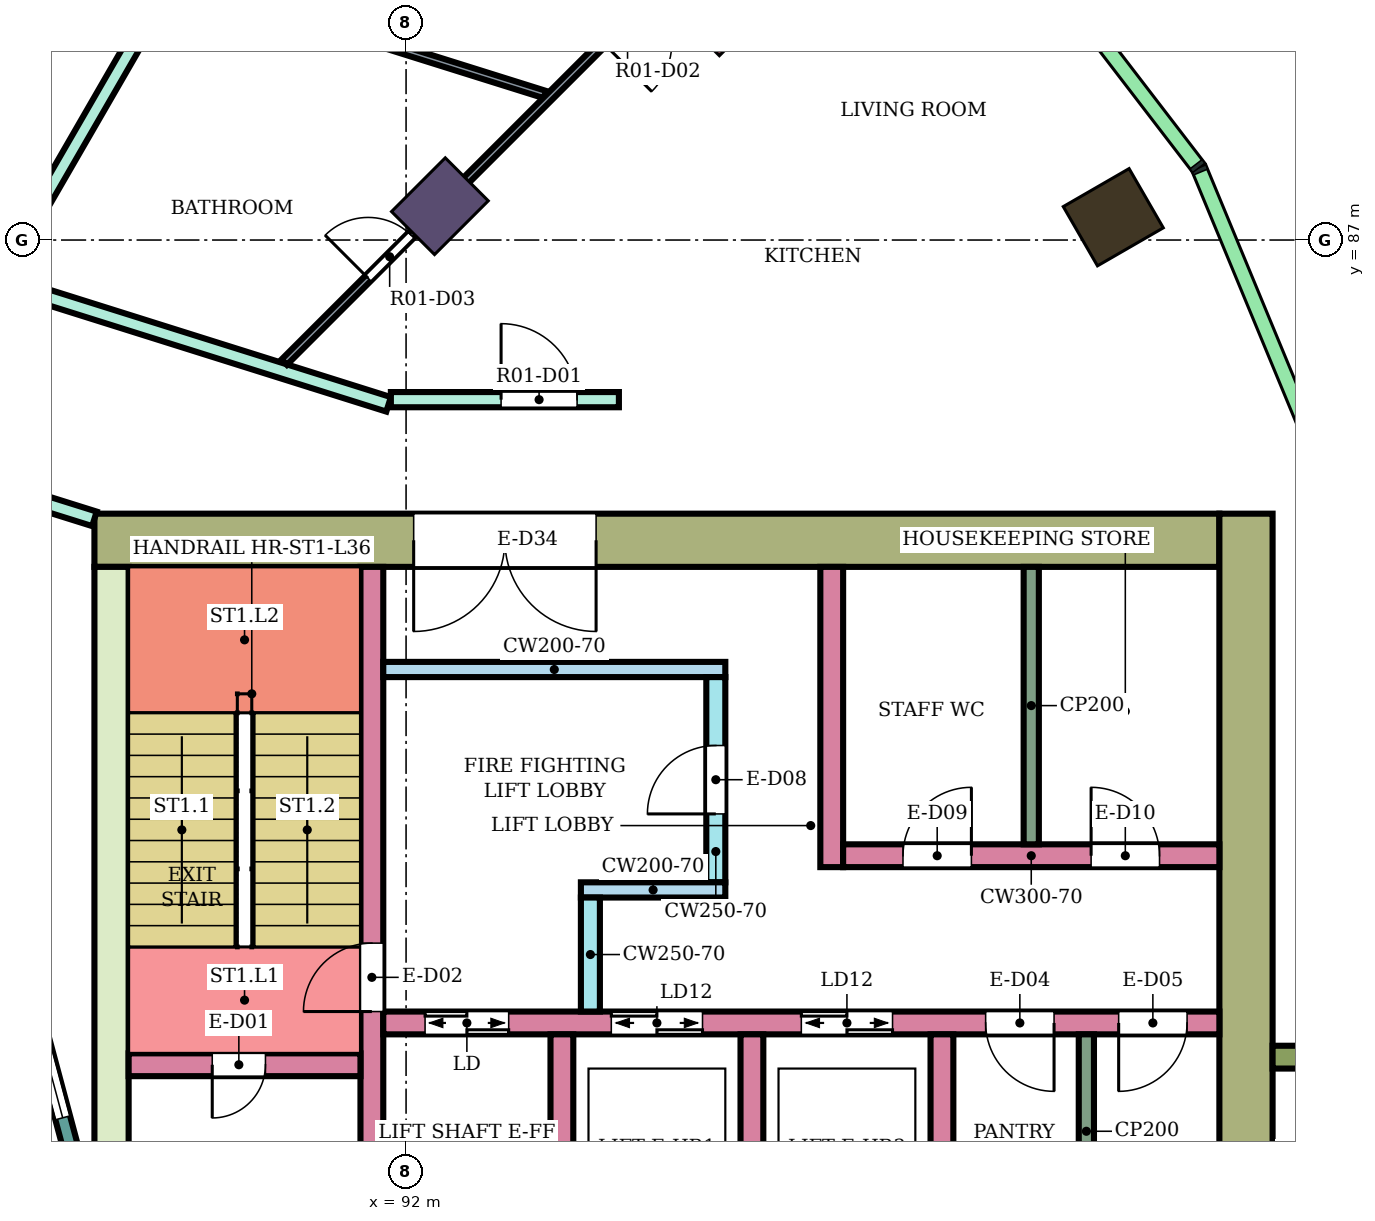
"""IFC4 building model, lengths in metres.
Left out: names, types, materials, properties, quantities, classifications, styles, units other than length and angle.
Written with IfcOpenShell. Run it as: python <this file> out.ifc"""

import sys

from ifc_helpers import new_model, si_unit, direction, frame, frame_2d, origin, origin_2d, place, context, subcontext, project, spatial, rectangle, extrude, element, fill, save


model = new_model("IFC4")
c1 = context("Model", 3, precision=1e-05, world=origin(), true_north=direction((0.0, 1.0)))
c2 = subcontext(c1, "Body", "Model", "MODEL_VIEW")
j1 = project(units=[si_unit("LENGTHUNIT", "METRE"), si_unit("PLANEANGLEUNIT", "RADIAN")], contexts=[c1])
p1 = place(None, origin())
s1 = spatial("IfcSite", under=j1, at=p1, CompositionType="ELEMENT")
p2 = place(p1, origin())
s2 = spatial("IfcBuilding", under=s1, at=p2, CompositionType="ELEMENT")
p3 = place(p2, frame((0.0, 0.0, 157.7)))
s3 = spatial("IfcBuildingStorey", under=s2, at=p3, CompositionType="ELEMENT", Elevation=157.7)
p4 = place(p3, frame((101.304, 87.3, 0.0), z_axis=(0.0, 0.0, 1.0), x_axis=(0.866025403784, 0.5, 0.0)))
e1 = element("IfcColumn", 1, at=p4, inside=s3, PredefinedType="COLUMN", context=c2, shape_type="SweptSolid", body=[
    extrude(rectangle(XDim=1.0, YDim=0.9, at=origin_2d()), origin(), (0.0, 0.0, 1.0), 4.1),
])
p5 = place(p3, frame((92.445, 87.445, 0.0), z_axis=(0.0, 0.0, 1.0), x_axis=(0.707106781187, 0.707106781187, 0.0)))
e2 = element("IfcColumn", 2, at=p5, inside=s3, PredefinedType="COLUMN", context=c2, shape_type="SweptSolid", body=[
    extrude(rectangle(XDim=1.0, YDim=0.8, at=origin_2d()), origin(), (0.0, 0.0, 1.0), 4.1),
])
p6 = place(p3, frame((95.91, 90.91, 0.0), z_axis=(0.0, 0.0, 1.0), x_axis=(0.707106781187, 0.707106781187, 0.0)))
e3 = element("IfcColumn", 3, at=p6, inside=s3, PredefinedType="COLUMN", context=c2, shape_type="SweptSolid", body=[
    extrude(rectangle(XDim=1.8, YDim=2.4, at=origin_2d()), origin(), (0.0, 0.0, 1.0), 4.1),
])
p7 = place(p3, frame((87.9, 83.05, 0.0), z_axis=(0.0, 0.0, 1.0), x_axis=(1.0, 0.0, 0.0)))
e4 = element("IfcWall", 4, at=p7, inside=s3, PredefinedType="SHEAR", context=c2, shape_type="SweptSolid", body=[
    extrude(rectangle(XDim=14.8, YDim=0.7, at=frame_2d((7.4, 0.0))), origin(), (0.0, 0.0, 1.0), 3.78),
])
p8 = place(p7, frame((4.2, 0.0, 0.0)))
e5 = element("IfcOpeningElement", 5, at=p8, cuts=e4, PredefinedType="OPENING", context=c2, shape_type="SweptSolid", body=[
    extrude(rectangle(XDim=2.4, YDim=2.4, at=frame_2d((1.2, 1.2))), frame((0.0, 0.36, 0.0), z_axis=(0.0, -1.0, 0.0), x_axis=(1.0, 0.0, 0.0)), (0.0, 0.0, 1.0), 0.72),
])
p9 = place(p3, frame((88.125, 75.0, 0.0), z_axis=(0.0, 0.0, 1.0), x_axis=(0.0, 1.0, 0.0)))
e6 = element("IfcWall", 6, at=p9, inside=s3, PredefinedType="SHEAR", context=c2, shape_type="SweptSolid", body=[
    extrude(rectangle(XDim=7.7, YDim=0.45, at=frame_2d((3.85, 0.0))), origin(), (0.0, 0.0, 1.0), 3.78),
])
p10 = place(p3, frame((103.05, 66.6, 0.0), z_axis=(0.0, 0.0, 1.0), x_axis=(0.0, 1.0, 0.0)))
e7 = element("IfcWall", 7, at=p10, inside=s3, PredefinedType="SHEAR", context=c2, shape_type="SweptSolid", body=[
    extrude(rectangle(XDim=16.8, YDim=0.7, at=frame_2d((8.4, 0.0))), origin(), (0.0, 0.0, 1.0), 3.78),
])
p11 = place(p3, frame((91.55, 75.0, 0.0), z_axis=(0.0, 0.0, 1.0), x_axis=(0.0, 1.0, 0.0)))
e8 = element("IfcWall", 8, at=p11, inside=s3, PredefinedType="SHEAR", context=c2, shape_type="SweptSolid", body=[
    extrude(rectangle(XDim=7.7, YDim=0.3, at=frame_2d((3.85, 0.0))), origin(), (0.0, 0.0, 1.0), 3.78),
])
p12 = place(p11, frame((1.85, 0.0, 0.0)))
e9 = element("IfcOpeningElement", 9, at=p12, cuts=e8, PredefinedType="OPENING", context=c2, shape_type="SweptSolid", body=[
    extrude(rectangle(XDim=0.9, YDim=2.1, at=frame_2d((0.45, 1.05))), frame((0.0, 0.16, 0.0), z_axis=(0.0, -1.0, 0.0), x_axis=(1.0, 0.0, 0.0)), (0.0, 0.0, 1.0), 0.32),
])
p13 = place(p3, frame((88.35, 76.15, 0.0), z_axis=(0.0, 0.0, 1.0), x_axis=(1.0, 0.0, 0.0)))
e10 = element("IfcWall", 10, at=p13, inside=s3, PredefinedType="SHEAR", context=c2, shape_type="SweptSolid", body=[
    extrude(rectangle(XDim=3.05, YDim=0.3, at=frame_2d((1.525, 0.0))), origin(), (0.0, 0.0, 1.0), 3.78),
])
p14 = place(p13, frame((1.1, 0.0, 0.0)))
e11 = element("IfcOpeningElement", 11, at=p14, cuts=e10, PredefinedType="OPENING", context=c2, shape_type="SweptSolid", body=[
    extrude(rectangle(XDim=0.7, YDim=2.0, at=frame_2d((0.35, 1.0))), frame((0.0, 0.16, 0.0), z_axis=(0.0, -1.0, 0.0), x_axis=(1.0, 0.0, 0.0)), (0.0, 0.0, 1.0), 0.32),
])
p15 = place(p3, frame((91.7, 76.7, 0.0), z_axis=(0.0, 0.0, 1.0), x_axis=(1.0, 0.0, 0.0)))
e12 = element("IfcWall", 12, at=p15, inside=s3, PredefinedType="SHEAR", context=c2, shape_type="SweptSolid", body=[
    extrude(rectangle(XDim=11.0, YDim=0.3, at=frame_2d((5.5, 0.0))), origin(), (0.0, 0.0, 1.0), 3.78),
])
p16 = place(p15, frame((0.55, 0.0, 0.0)))
e13 = element("IfcOpeningElement", 13, at=p16, cuts=e12, PredefinedType="OPENING", context=c2, shape_type="SweptSolid", body=[
    extrude(rectangle(XDim=1.1, YDim=2.1, at=frame_2d((0.55, 1.05))), frame((0.0, 0.16, 0.0), z_axis=(0.0, -1.0, 0.0), x_axis=(1.0, 0.0, 0.0)), (0.0, 0.0, 1.0), 0.32),
])
p17 = place(p15, frame((3.0, 0.0, 0.0)))
e14 = element("IfcOpeningElement", 14, at=p17, cuts=e12, PredefinedType="OPENING", context=c2, shape_type="SweptSolid", body=[
    extrude(rectangle(XDim=1.2, YDim=2.1, at=frame_2d((0.6, 1.05))), frame((0.0, 0.16, 0.0), z_axis=(0.0, -1.0, 0.0), x_axis=(1.0, 0.0, 0.0)), (0.0, 0.0, 1.0), 0.32),
])
p18 = place(p15, frame((5.5, 0.0, 0.0)))
e15 = element("IfcOpeningElement", 15, at=p18, cuts=e12, PredefinedType="OPENING", context=c2, shape_type="SweptSolid", body=[
    extrude(rectangle(XDim=1.2, YDim=2.1, at=frame_2d((0.6, 1.05))), frame((0.0, 0.16, 0.0), z_axis=(0.0, -1.0, 0.0), x_axis=(1.0, 0.0, 0.0)), (0.0, 0.0, 1.0), 0.32),
])
p19 = place(p15, frame((7.925, 0.0, 0.0)))
e16 = element("IfcOpeningElement", 16, at=p19, cuts=e12, PredefinedType="OPENING", context=c2, shape_type="SweptSolid", body=[
    extrude(rectangle(XDim=0.9, YDim=2.1, at=frame_2d((0.45, 1.05))), frame((0.0, 0.16, 0.0), z_axis=(0.0, -1.0, 0.0), x_axis=(1.0, 0.0, 0.0)), (0.0, 0.0, 1.0), 0.32),
])
p20 = place(p15, frame((9.675, 0.0, 0.0)))
e17 = element("IfcOpeningElement", 17, at=p20, cuts=e12, PredefinedType="OPENING", context=c2, shape_type="SweptSolid", body=[
    extrude(rectangle(XDim=0.9, YDim=2.1, at=frame_2d((0.45, 1.05))), frame((0.0, 0.16, 0.0), z_axis=(0.0, -1.0, 0.0), x_axis=(1.0, 0.0, 0.0)), (0.0, 0.0, 1.0), 0.32),
])
for number, where, z_axis, x_axis in (
    (18, (94.05, 74.0, 0.0), (0.0, 0.0, 1.0), (0.0, 1.0, 0.0)),
    (19, (96.55, 74.0, 0.0), (0.0, 0.0, 1.0), (0.0, 1.0, 0.0)),
    (20, (99.05, 74.0, 0.0), (0.0, 0.0, 1.0), (0.0, 1.0, 0.0)),
):
    element("IfcWall", number, at=place(p3, frame(where, z_axis=z_axis, x_axis=x_axis)), inside=s3, PredefinedType="SHEAR", context=c2, shape_type="SweptSolid", body=[
        extrude(rectangle(XDim=2.55, YDim=0.3, at=frame_2d((1.275, 0.0))), origin(), (0.0, 0.0, 1.0), 3.78),
    ])
p21 = place(p3, frame((91.7, 81.35, 0.0), z_axis=(0.0, 0.0, 1.0), x_axis=(1.0, 0.0, 0.0)))
e21 = element("IfcWall", 21, at=p21, inside=s3, PredefinedType="SHEAR", context=c2, shape_type="SweptSolid", body=[
    extrude(rectangle(XDim=4.5, YDim=0.2, at=frame_2d((2.25, 0.0))), origin(), (0.0, 0.0, 1.0), 3.78),
])
p22 = place(p3, frame((96.075, 78.55, 0.0), z_axis=(0.0, 0.0, 1.0), x_axis=(0.0, 1.0, 0.0)))
e22 = element("IfcWall", 22, at=p22, inside=s3, PredefinedType="SHEAR", context=c2, shape_type="SweptSolid", body=[
    extrude(rectangle(XDim=2.7, YDim=0.25, at=frame_2d((1.35, 0.0))), origin(), (0.0, 0.0, 1.0), 3.78),
])
p23 = place(p22, frame((0.9, 0.0, 0.0)))
e23 = element("IfcOpeningElement", 23, at=p23, cuts=e22, PredefinedType="OPENING", context=c2, shape_type="SweptSolid", body=[
    extrude(rectangle(XDim=0.9, YDim=2.1, at=frame_2d((0.45, 1.05))), frame((0.0, 0.135, 0.0), z_axis=(0.0, -1.0, 0.0), x_axis=(1.0, 0.0, 0.0)), (0.0, 0.0, 1.0), 0.27),
])
p24 = place(p3, frame((94.3, 78.45, 0.0), z_axis=(0.0, 0.0, 1.0), x_axis=(1.0, 0.0, 0.0)))
e24 = element("IfcWall", 24, at=p24, inside=s3, PredefinedType="SHEAR", context=c2, shape_type="SweptSolid", body=[
    extrude(rectangle(XDim=1.9, YDim=0.2, at=frame_2d((0.95, 0.0))), origin(), (0.0, 0.0, 1.0), 3.78),
])
p25 = place(p3, frame((94.425, 76.85, 0.0), z_axis=(0.0, 0.0, 1.0), x_axis=(0.0, 1.0, 0.0)))
e25 = element("IfcWall", 25, at=p25, inside=s3, PredefinedType="SHEAR", context=c2, shape_type="SweptSolid", body=[
    extrude(rectangle(XDim=1.5, YDim=0.25, at=frame_2d((0.75, 0.0))), origin(), (0.0, 0.0, 1.0), 3.78),
])
p26 = place(p3, frame((97.6, 78.75, 0.0), z_axis=(0.0, 0.0, 1.0), x_axis=(0.0, 1.0, 0.0)))
e26 = element("IfcWall", 26, at=p26, inside=s3, PredefinedType="SHEAR", context=c2, shape_type="SweptSolid", body=[
    extrude(rectangle(XDim=3.95, YDim=0.3, at=frame_2d((1.975, 0.0))), origin(), (0.0, 0.0, 1.0), 3.78),
])
p27 = place(p3, frame((97.75, 78.9, 0.0), z_axis=(0.0, 0.0, 1.0), x_axis=(1.0, 0.0, 0.0)))
e27 = element("IfcWall", 27, at=p27, inside=s3, PredefinedType="SHEAR", context=c2, shape_type="SweptSolid", body=[
    extrude(rectangle(XDim=4.95, YDim=0.3, at=frame_2d((2.475, 0.0))), origin(), (0.0, 0.0, 1.0), 3.78),
])
p28 = place(p27, frame((0.788, 0.0, 0.0)))
e28 = element("IfcOpeningElement", 28, at=p28, cuts=e27, PredefinedType="OPENING", context=c2, shape_type="SweptSolid", body=[
    extrude(rectangle(XDim=0.9, YDim=2.1, at=frame_2d((0.45, 1.05))), frame((0.0, 0.16, 0.0), z_axis=(0.0, -1.0, 0.0), x_axis=(1.0, 0.0, 0.0)), (0.0, 0.0, 1.0), 0.32),
])
p29 = place(p27, frame((3.262, 0.0, 0.0)))
e29 = element("IfcOpeningElement", 29, at=p29, cuts=e27, PredefinedType="OPENING", context=c2, shape_type="SweptSolid", body=[
    extrude(rectangle(XDim=0.9, YDim=2.1, at=frame_2d((0.45, 1.05))), frame((0.0, 0.16, 0.0), z_axis=(0.0, -1.0, 0.0), x_axis=(1.0, 0.0, 0.0)), (0.0, 0.0, 1.0), 0.32),
])
p30 = place(p3, frame((103.4, 76.25, 0.0), z_axis=(0.0, 0.0, 1.0), x_axis=(1.0, 0.0, 0.0)))
e30 = element("IfcWall", 30, at=p30, inside=s3, PredefinedType="NOTDEFINED", context=c2, shape_type="SweptSolid", body=[
    extrude(rectangle(XDim=2.416, YDim=0.3, at=frame_2d((1.208, 0.0))), origin(), (0.0, 0.0, 1.0), 4.1),
])
p31 = place(p3, frame((87.604, 75.0, 0.0), z_axis=(0.0, 0.0, 1.0), x_axis=(-0.258789828301, 0.965933654434, 0.0)))
e31 = element("IfcWall", 31, at=p31, inside=s3, PredefinedType="NOTDEFINED", context=c2, shape_type="SweptSolid", body=[
    extrude(rectangle(XDim=3.936, YDim=0.2, at=frame_2d((1.968, 0.0))), origin(), (0.0, 0.0, 1.0), 4.1),
])
p32 = place(p31, frame((0.468, 0.0, 0.9)))
e32 = element("IfcOpeningElement", 32, at=p32, cuts=e31, PredefinedType="OPENING", context=c2, shape_type="SweptSolid", body=[
    extrude(rectangle(XDim=3.0, YDim=2.3, at=frame_2d((1.5, 1.15))), frame((0.0, 0.11, 0.0), z_axis=(0.0, -1.0, 0.0), x_axis=(1.0, 0.0, 0.0)), (0.0, 0.0, 1.0), 0.22),
])
p33 = place(p3, frame((85.587, 84.057, 0.0), z_axis=(0.0, 0.0, 1.0), x_axis=(0.954239513179, -0.299043393987, 0.0)))
e33 = element("IfcWall", 33, at=p33, inside=s3, PredefinedType="PARTITIONING", context=c2, shape_type="SweptSolid", body=[
    extrude(rectangle(XDim=2.424, YDim=0.2, at=frame_2d((1.212, 0.0))), origin(), (0.0, 0.0, 1.0), 3.65),
])
p34 = place(p33, frame((0.762, 0.0, 0.0)))
e34 = element("IfcOpeningElement", 34, at=p34, cuts=e33, PredefinedType="OPENING", context=c2, shape_type="SweptSolid", body=[
    extrude(rectangle(XDim=0.9, YDim=2.1, at=frame_2d((0.45, 1.05))), frame((0.0, 0.11, 0.0), z_axis=(0.0, -1.0, 0.0), x_axis=(1.0, 0.0, 0.0)), (0.0, 0.0, 1.0), 0.22),
])
p35 = place(p3, frame((86.313, 86.555, 0.0), z_axis=(0.0, 0.0, 1.0), x_axis=(0.953919398959, -0.300062960544, 0.0)))
e35 = element("IfcWall", 35, at=p35, inside=s3, PredefinedType="PARTITIONING", context=c2, shape_type="SweptSolid", body=[
    extrude(rectangle(XDim=5.721, YDim=0.2, at=frame_2d((2.86, 0.0))), origin(), (0.0, 0.0, 1.0), 3.65),
])
p36 = place(p3, frame((86.677, 86.564, 0.0), z_axis=(0.0, 0.0, 1.0), x_axis=(0.500120377296, 0.865955892764, 0.0)))
e36 = element("IfcWall", 36, at=p36, inside=s3, PredefinedType="PARTITIONING", context=c2, shape_type="SweptSolid", body=[
    extrude(rectangle(XDim=12.445, YDim=0.2, at=frame_2d((6.222, 0.0))), origin(), (0.0, 0.0, 1.0), 3.65),
])
p37 = place(p3, frame((91.8, 84.9, 0.0), z_axis=(0.0, 0.0, 1.0), x_axis=(1.0, 0.0, 0.0)))
e37 = element("IfcWall", 37, at=p37, inside=s3, PredefinedType="PARTITIONING", context=c2, shape_type="SweptSolid", body=[
    extrude(rectangle(XDim=3.0, YDim=0.2, at=frame_2d((1.5, 0.0))), origin(), (0.0, 0.0, 1.0), 3.65),
])
p38 = place(p37, frame((1.45, 0.0, 0.0)))
e38 = element("IfcOpeningElement", 38, at=p38, cuts=e37, PredefinedType="OPENING", context=c2, shape_type="SweptSolid", body=[
    extrude(rectangle(XDim=1.0, YDim=2.1, at=frame_2d((0.5, 1.05))), frame((0.0, 0.11, 0.0), z_axis=(0.0, -1.0, 0.0), x_axis=(1.0, 0.0, 0.0)), (0.0, 0.0, 1.0), 0.22),
])
p39 = place(p3, frame((89.026, 90.419, 0.0), z_axis=(0.0, 0.0, 1.0), x_axis=(0.954207609901, -0.299145177475, 0.0)))
e39 = element("IfcWall", 39, at=p39, inside=s3, PredefinedType="PARTITIONING", context=c2, shape_type="SweptSolid", body=[
    extrude(rectangle(XDim=5.031, YDim=0.1, at=frame_2d((2.516, 0.0))), origin(), (0.0, 0.0, 1.0), 3.65),
])
p40 = place(p3, frame((90.396, 85.393, 0.0), z_axis=(0.0, 0.0, 1.0), x_axis=(0.707236031471, 0.706977507273, 0.0)))
e40 = element("IfcWall", 40, at=p40, inside=s3, PredefinedType="PARTITIONING", context=c2, shape_type="SweptSolid", body=[
    extrude(rectangle(XDim=8.499, YDim=0.1, at=frame_2d((4.25, 0.0))), origin(), (0.0, 0.0, 1.0), 3.65),
])
p41 = place(p40, frame((5.937, 0.0, 0.0)))
e41 = element("IfcOpeningElement", 41, at=p41, cuts=e40, PredefinedType="OPENING", context=c2, shape_type="SweptSolid", body=[
    extrude(rectangle(XDim=0.9, YDim=2.1, at=frame_2d((0.45, 1.05))), frame((0.0, 0.06, 0.0), z_axis=(0.0, -1.0, 0.0), x_axis=(1.0, 0.0, 0.0)), (0.0, 0.0, 1.0), 0.12),
])
p42 = place(p40, frame((1.562, 0.0, 0.0)))
e42 = element("IfcOpeningElement", 42, at=p42, cuts=e40, PredefinedType="OPENING", context=c2, shape_type="SweptSolid", body=[
    extrude(rectangle(XDim=0.8, YDim=2.1, at=frame_2d((0.4, 1.05))), frame((0.0, 0.06, 0.0), z_axis=(0.0, -1.0, 0.0), x_axis=(1.0, 0.0, 0.0)), (0.0, 0.0, 1.0), 0.12),
])
p43 = place(p3, frame((100.95, 74.0, 0.0), z_axis=(0.0, 0.0, 1.0), x_axis=(0.0, 1.0, 0.0)))
e43 = element("IfcWall", 43, at=p43, inside=s3, PredefinedType="PARTITIONING", context=c2, shape_type="SweptSolid", body=[
    extrude(rectangle(XDim=2.55, YDim=0.2, at=frame_2d((1.275, 0.0))), origin(), (0.0, 0.0, 1.0), 3.78),
])
p44 = place(p3, frame((100.225, 79.05, 0.0), z_axis=(0.0, 0.0, 1.0), x_axis=(0.0, 1.0, 0.0)))
e44 = element("IfcWall", 44, at=p44, inside=s3, PredefinedType="PARTITIONING", context=c2, shape_type="SweptSolid", body=[
    extrude(rectangle(XDim=3.65, YDim=0.2, at=frame_2d((1.825, 0.0))), origin(), (0.0, 0.0, 1.0), 3.78),
])
p45 = place(p32, origin())
e45 = element("IfcWindow", 45, at=p45, inside=s3, PartitioningType="SINGLE_PANEL", PredefinedType="WINDOW", context=c2, shape_type="SweptSolid", body=[
    extrude(rectangle(XDim=3.0, YDim=2.3, at=frame_2d((1.5, 1.15))), frame((0.0, 0.03, 0.0), z_axis=(0.0, -1.0, 0.0), x_axis=(1.0, 0.0, 0.0)), (0.0, 0.0, 1.0), 0.06),
])
fill(e32, e45)
p46 = place(p38, origin())
e46 = element("IfcDoor", 46, at=p46, inside=s3, OperationType="SINGLE_SWING_LEFT", PredefinedType="DOOR", context=c2, shape_type="SweptSolid", body=[
    extrude(rectangle(XDim=1.0, YDim=2.1, at=frame_2d((0.5, 1.05))), frame((0.0, 0.025, 0.0), z_axis=(0.0, -1.0, 0.0), x_axis=(1.0, 0.0, 0.0)), (0.0, 0.0, 1.0), 0.05),
])
fill(e38, e46)
p47 = place(p42, origin())
e47 = element("IfcDoor", 47, at=p47, inside=s3, OperationType="SINGLE_SWING_LEFT", PredefinedType="DOOR", context=c2, shape_type="SweptSolid", body=[
    extrude(rectangle(XDim=0.8, YDim=2.1, at=frame_2d((0.4, 1.05))), frame((0.0, 0.025, 0.0), z_axis=(0.0, -1.0, 0.0), x_axis=(1.0, 0.0, 0.0)), (0.0, 0.0, 1.0), 0.05),
])
fill(e42, e47)
p48 = place(p14, frame((0.7, 0.0, 0.0), z_axis=(0.0, 0.0, 1.0), x_axis=(-1.0, 0.0, 0.0)))
e48 = element("IfcDoor", 48, at=p48, inside=s3, OperationType="SINGLE_SWING_RIGHT", PredefinedType="DOOR", context=c2, shape_type="SweptSolid", body=[
    extrude(rectangle(XDim=0.7, YDim=2.0, at=frame_2d((0.35, 1.0))), frame((0.0, 0.025, 0.0), z_axis=(0.0, -1.0, 0.0), x_axis=(1.0, 0.0, 0.0)), (0.0, 0.0, 1.0), 0.05),
])
fill(e11, e48)
p49 = place(p12, origin())
e49 = element("IfcDoor", 49, at=p49, inside=s3, OperationType="SINGLE_SWING_LEFT", PredefinedType="DOOR", context=c2, shape_type="SweptSolid", body=[
    extrude(rectangle(XDim=0.9, YDim=2.1, at=frame_2d((0.45, 1.05))), frame((0.0, 0.025, 0.0), z_axis=(0.0, -1.0, 0.0), x_axis=(1.0, 0.0, 0.0)), (0.0, 0.0, 1.0), 0.05),
])
fill(e9, e49)
p50 = place(p16, origin())
e50 = element("IfcDoor", 50, at=p50, inside=s3, OperationType="DOUBLE_DOOR_SLIDING", PredefinedType="DOOR", context=c2, shape_type="SweptSolid", body=[
    extrude(rectangle(XDim=1.1, YDim=2.1, at=frame_2d((0.55, 1.05))), frame((0.0, 0.025, 0.0), z_axis=(0.0, -1.0, 0.0), x_axis=(1.0, 0.0, 0.0)), (0.0, 0.0, 1.0), 0.05),
])
fill(e13, e50)
p51 = place(p17, origin())
e51 = element("IfcDoor", 51, at=p51, inside=s3, OperationType="DOUBLE_DOOR_SLIDING", PredefinedType="DOOR", context=c2, shape_type="SweptSolid", body=[
    extrude(rectangle(XDim=1.2, YDim=2.1, at=frame_2d((0.6, 1.05))), frame((0.0, 0.025, 0.0), z_axis=(0.0, -1.0, 0.0), x_axis=(1.0, 0.0, 0.0)), (0.0, 0.0, 1.0), 0.05),
])
fill(e14, e51)
p52 = place(p18, origin())
e52 = element("IfcDoor", 52, at=p52, inside=s3, OperationType="DOUBLE_DOOR_SLIDING", PredefinedType="DOOR", context=c2, shape_type="SweptSolid", body=[
    extrude(rectangle(XDim=1.2, YDim=2.1, at=frame_2d((0.6, 1.05))), frame((0.0, 0.025, 0.0), z_axis=(0.0, -1.0, 0.0), x_axis=(1.0, 0.0, 0.0)), (0.0, 0.0, 1.0), 0.05),
])
fill(e15, e52)
p53 = place(p19, frame((0.9, 0.0, 0.0), z_axis=(0.0, 0.0, 1.0), x_axis=(-1.0, 0.0, 0.0)))
e53 = element("IfcDoor", 53, at=p53, inside=s3, OperationType="SINGLE_SWING_LEFT", PredefinedType="DOOR", context=c2, shape_type="SweptSolid", body=[
    extrude(rectangle(XDim=0.9, YDim=2.1, at=frame_2d((0.45, 1.05))), frame((0.0, 0.025, 0.0), z_axis=(0.0, -1.0, 0.0), x_axis=(1.0, 0.0, 0.0)), (0.0, 0.0, 1.0), 0.05),
])
fill(e16, e53)
p54 = place(p20, frame((0.9, 0.0, 0.0), z_axis=(0.0, 0.0, 1.0), x_axis=(-1.0, 0.0, 0.0)))
e54 = element("IfcDoor", 54, at=p54, inside=s3, OperationType="SINGLE_SWING_RIGHT", PredefinedType="DOOR", context=c2, shape_type="SweptSolid", body=[
    extrude(rectangle(XDim=0.9, YDim=2.1, at=frame_2d((0.45, 1.05))), frame((0.0, 0.025, 0.0), z_axis=(0.0, -1.0, 0.0), x_axis=(1.0, 0.0, 0.0)), (0.0, 0.0, 1.0), 0.05),
])
fill(e17, e54)
p55 = place(p23, origin())
e55 = element("IfcDoor", 55, at=p55, inside=s3, OperationType="SINGLE_SWING_LEFT", PredefinedType="DOOR", context=c2, shape_type="SweptSolid", body=[
    extrude(rectangle(XDim=0.9, YDim=2.1, at=frame_2d((0.45, 1.05))), frame((0.0, 0.025, 0.0), z_axis=(0.0, -1.0, 0.0), x_axis=(1.0, 0.0, 0.0)), (0.0, 0.0, 1.0), 0.05),
])
fill(e23, e55)
p56 = place(p28, origin())
e56 = element("IfcDoor", 56, at=p56, inside=s3, OperationType="SINGLE_SWING_RIGHT", PredefinedType="DOOR", context=c2, shape_type="SweptSolid", body=[
    extrude(rectangle(XDim=0.9, YDim=2.1, at=frame_2d((0.45, 1.05))), frame((0.0, 0.025, 0.0), z_axis=(0.0, -1.0, 0.0), x_axis=(1.0, 0.0, 0.0)), (0.0, 0.0, 1.0), 0.05),
])
fill(e28, e56)
p57 = place(p29, origin())
e57 = element("IfcDoor", 57, at=p57, inside=s3, OperationType="SINGLE_SWING_LEFT", PredefinedType="DOOR", context=c2, shape_type="SweptSolid", body=[
    extrude(rectangle(XDim=0.9, YDim=2.1, at=frame_2d((0.45, 1.05))), frame((0.0, 0.025, 0.0), z_axis=(0.0, -1.0, 0.0), x_axis=(1.0, 0.0, 0.0)), (0.0, 0.0, 1.0), 0.05),
])
fill(e29, e57)
p58 = place(p8, frame((2.4, 0.0, 0.0), z_axis=(0.0, 0.0, 1.0), x_axis=(-1.0, 0.0, 0.0)))
e58 = element("IfcDoor", 58, at=p58, inside=s3, OperationType="DOUBLE_DOOR_SINGLE_SWING", PredefinedType="DOOR", context=c2, shape_type="SweptSolid", body=[
    extrude(rectangle(XDim=2.4, YDim=2.4, at=frame_2d((1.2, 1.2))), frame((0.0, 0.025, 0.0), z_axis=(0.0, -1.0, 0.0), x_axis=(1.0, 0.0, 0.0)), (0.0, 0.0, 1.0), 0.05),
])
fill(e5, e58)
save(model, sys.argv[1])
